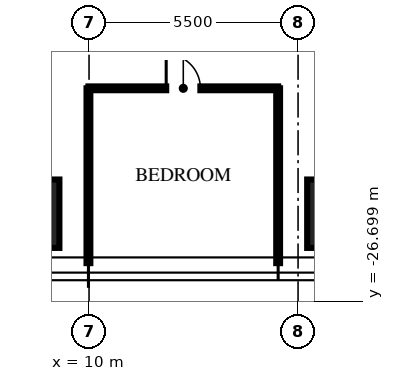
"""IFC4 building model, lengths in metres.
Left out: names, types, materials, properties, quantities, classifications, styles, units other than length and angle.
Written with IfcOpenShell. Run it as: python <this file> out.ifc"""

import sys

from ifc_helpers import new_model, si_unit, direction, frame, frame_2d, origin, origin_2d, place, context, subcontext, project, spatial, rectangle, extrude, element, fill, save


model = new_model("IFC4")
c1 = context("Model", 3, precision=1e-05, world=origin(), true_north=direction((0.0, 1.0)))
c2 = subcontext(c1, "Body", "Model", "MODEL_VIEW")
j1 = project(units=[si_unit("LENGTHUNIT", "METRE"), si_unit("PLANEANGLEUNIT", "RADIAN")], contexts=[c1])
p1 = place(None, origin())
s1 = spatial("IfcSite", under=j1, at=p1, CompositionType="ELEMENT")
p2 = place(p1, origin())
s2 = spatial("IfcBuilding", under=s1, at=p2, CompositionType="ELEMENT")
p3 = place(p2, frame((0.0, 0.0, 244.5)))
s3 = spatial("IfcBuildingStorey", under=s2, at=p3, CompositionType="ELEMENT", Elevation=244.5)
for number, where, z_axis, x_axis in (
    (1, (16.64, -24.4, 0.0), (0.0, 0.0, 1.0), (1.0, 0.0, 0.0)),
    (2, (8.32, -24.4, 0.0), (0.0, 0.0, 1.0), (1.0, 0.0, 0.0)),
):
    element("IfcColumn", number, at=place(p3, frame(where, z_axis=z_axis, x_axis=x_axis)), inside=s3, PredefinedType="COLUMN", context=c2, shape_type="SweptSolid", body=[
        extrude(rectangle(XDim=1.8, YDim=1.8, at=origin_2d()), origin(), (0.0, 0.0, 1.0), 3.75),
    ])
for number, where, z_axis, x_axis in (
    (3, (9.984, -21.1, 0.0), (0.0, 0.0, 1.0), (0.0, -1.0, 0.0)),
    (4, (14.976, -21.1, 0.0), (0.0, 0.0, 1.0), (0.0, -1.0, 0.0)),
):
    element("IfcWall", number, at=place(p3, frame(where, z_axis=z_axis, x_axis=x_axis)), inside=s3, PredefinedType="PARTITIONING", context=c2, shape_type="SweptSolid", body=[
        extrude(rectangle(XDim=4.6, YDim=0.1, at=frame_2d((2.3, 0.0))), origin(), (0.0, 0.0, 1.0), 2.91),
    ])
p4 = place(p3, frame((9.984, -21.1, 0.0), z_axis=(0.0, 0.0, 1.0), x_axis=(1.0, 0.0, 0.0)))
e5 = element("IfcWall", 5, at=p4, inside=s3, PredefinedType="PARTITIONING", context=c2, shape_type="SweptSolid", body=[
    extrude(rectangle(XDim=4.992, YDim=0.1, at=frame_2d((2.496, 0.0))), origin(), (0.0, 0.0, 1.0), 2.81),
])
p5 = place(p4, frame((2.046, 0.0, 0.0)))
e6 = element("IfcOpeningElement", 6, at=p5, cuts=e5, PredefinedType="OPENING", context=c2, shape_type="SweptSolid", body=[
    extrude(rectangle(XDim=0.9, YDim=2.1, at=frame_2d((0.45, 1.05))), frame((0.0, 0.06, 0.0), z_axis=(0.0, -1.0, 0.0), x_axis=(1.0, 0.0, 0.0)), (0.0, 0.0, 1.0), 0.12),
])
p6 = place(p5, origin())
e7 = element("IfcDoor", 7, at=p6, inside=s3, OperationType="SINGLE_SWING_LEFT", PredefinedType="DOOR", context=c2, shape_type="SweptSolid", body=[
    extrude(rectangle(XDim=0.9, YDim=2.1, at=frame_2d((0.45, 1.05))), frame((0.0, 0.025, 0.0), z_axis=(0.0, -1.0, 0.0), x_axis=(1.0, 0.0, 0.0)), (0.0, 0.0, 1.0), 0.05),
])
fill(e6, e7)
save(model, sys.argv[1])
